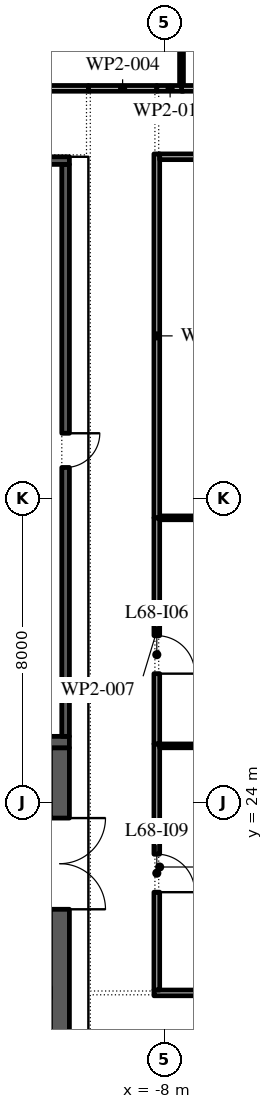
"""IFC4 building model, lengths in metres.
Left out: names, types, materials, properties, quantities, classifications, styles, units other than length and angle.
Written with IfcOpenShell. Run it as: python <this file> out.ifc"""

import sys

from ifc_helpers import new_model, si_unit, direction, frame, frame_2d, origin, place, context, subcontext, project, spatial, rectangle, extrude, element, fill, save


model = new_model("IFC4")
c1 = context("Model", 3, precision=1e-05, world=origin(), true_north=direction((0.0, 1.0)))
c2 = subcontext(c1, "Body", "Model", "MODEL_VIEW")
j1 = project(units=[si_unit("LENGTHUNIT", "METRE"), si_unit("PLANEANGLEUNIT", "RADIAN")], contexts=[c1])
p1 = place(None, origin())
s1 = spatial("IfcSite", under=j1, at=p1, CompositionType="ELEMENT")
p2 = place(p1, origin())
s2 = spatial("IfcBuilding", under=s1, at=p2, CompositionType="ELEMENT")
p3 = place(p2, frame((0.0, 0.0, 313.2)))
s3 = spatial("IfcBuildingStorey", under=s2, at=p3, CompositionType="ELEMENT", Elevation=313.2)
p4 = place(p3, frame((-10.75, -2.45, 0.0), z_axis=(0.0, 0.0, 1.0), x_axis=(0.0, 1.0, 0.0)))
e1 = element("IfcWall", 1, at=p4, inside=s3, PredefinedType="SHEAR", context=c2, shape_type="SweptSolid", body=[
    extrude(rectangle(XDim=27.9, YDim=0.5, at=frame_2d((13.95, 0.0))), origin(), (0.0, 0.0, 1.0), 4.0),
])
p5 = place(p4, frame((23.65, 0.0, 0.0)))
e2 = element("IfcOpeningElement", 2, at=p5, cuts=e1, PredefinedType="OPENING", context=c2, shape_type="SweptSolid", body=[
    extrude(rectangle(XDim=2.4, YDim=2.1, at=frame_2d((1.2, 1.05))), frame((0.0, 0.26, 0.0), z_axis=(0.0, -1.0, 0.0), x_axis=(1.0, 0.0, 0.0)), (0.0, 0.0, 1.0), 0.52),
])
p6 = place(p4, frame((0.788, 0.0, 0.0)))
e3 = element("IfcOpeningElement", 3, at=p6, cuts=e1, PredefinedType="OPENING", context=c2, shape_type="SweptSolid", body=[
    extrude(rectangle(XDim=0.9, YDim=2.1, at=frame_2d((0.45, 1.05))), frame((0.0, 0.26, 0.0), z_axis=(0.0, -1.0, 0.0), x_axis=(1.0, 0.0, 0.0)), (0.0, 0.0, 1.0), 0.52),
])
p7 = place(p4, frame((3.962, 0.0, 0.0)))
e4 = element("IfcOpeningElement", 4, at=p7, cuts=e1, PredefinedType="OPENING", context=c2, shape_type="SweptSolid", body=[
    extrude(rectangle(XDim=1.0, YDim=2.1, at=frame_2d((0.5, 1.05))), frame((0.0, 0.26, 0.0), z_axis=(0.0, -1.0, 0.0), x_axis=(1.0, 0.0, 0.0)), (0.0, 0.0, 1.0), 0.52),
])
p8 = place(p3, frame((-21.5, 25.6, 0.0), z_axis=(0.0, 0.0, 1.0), x_axis=(1.0, 0.0, 0.0)))
e5 = element("IfcWall", 5, at=p8, inside=s3, PredefinedType="SHEAR", context=c2, shape_type="SweptSolid", body=[
    extrude(rectangle(XDim=11.0, YDim=0.3, at=frame_2d((5.5, 0.0))), origin(), (0.0, 0.0, 1.0), 4.0),
])
p9 = place(p3, frame((-10.6, 25.75, 0.0), z_axis=(0.0, 0.0, 1.0), x_axis=(0.0, 1.0, 0.0)))
e6 = element("IfcWall", 6, at=p9, inside=s3, PredefinedType="SHEAR", context=c2, shape_type="SweptSolid", body=[
    extrude(rectangle(XDim=15.05, YDim=0.2, at=frame_2d((7.525, 0.0))), origin(), (0.0, 0.0, 1.0), 4.0),
])
p10 = place(p9, frame((7.075, 0.0, 0.0)))
e7 = element("IfcOpeningElement", 7, at=p10, cuts=e6, PredefinedType="OPENING", context=c2, shape_type="SweptSolid", body=[
    extrude(rectangle(XDim=0.9, YDim=2.1, at=frame_2d((0.45, 1.05))), frame((0.0, 0.11, 0.0), z_axis=(0.0, -1.0, 0.0), x_axis=(1.0, 0.0, 0.0)), (0.0, 0.0, 1.0), 0.22),
])
p11 = place(p3, frame((-21.5, 40.9, 0.0), z_axis=(0.0, 0.0, 1.0), x_axis=(1.0, 0.0, 0.0)))
e8 = element("IfcWall", 8, at=p11, inside=s3, PredefinedType="SHEAR", context=c2, shape_type="SweptSolid", body=[
    extrude(rectangle(XDim=11.0, YDim=0.2, at=frame_2d((5.5, 0.0))), origin(), (0.0, 0.0, 1.0), 4.0),
])
p12 = place(p3, frame((-26.05, 42.8, 0.0), z_axis=(0.0, 0.0, 1.0), x_axis=(1.0, 0.0, 0.0)))
e9 = element("IfcWall", 9, at=p12, inside=s3, PredefinedType="PARTITIONING", context=c2, shape_type="SweptSolid", body=[
    extrude(rectangle(XDim=16.05, YDim=0.15, at=frame_2d((8.025, 0.0))), origin(), (0.0, 0.0, 1.0), 4.0),
])
p13 = place(p12, frame((4.15, 0.0, 0.0)))
e10 = element("IfcOpeningElement", 10, at=p13, cuts=e9, PredefinedType="OPENING", context=c2, shape_type="SweptSolid", body=[
    extrude(rectangle(XDim=1.0, YDim=2.1, at=frame_2d((0.5, 1.05))), frame((0.0, 0.085, 0.0), z_axis=(0.0, -1.0, 0.0), x_axis=(1.0, 0.0, 0.0)), (0.0, 0.0, 1.0), 0.17),
])
p14 = place(p3, frame((-10.0, 42.8, 0.0), z_axis=(0.0, 0.0, 1.0), x_axis=(1.0, 0.0, 0.0)))
e11 = element("IfcWall", 11, at=p14, inside=s3, PredefinedType="PARTITIONING", context=c2, shape_type="SweptSolid", body=[
    extrude(rectangle(XDim=1.8, YDim=0.15, at=frame_2d((0.9, 0.0))), origin(), (0.0, 0.0, 1.0), 4.0),
])
p15 = place(p3, frame((-8.275, 19.0, 0.0), z_axis=(0.0, 0.0, 1.0), x_axis=(1.0, 0.0, 0.0)))
e12 = element("IfcWall", 12, at=p15, inside=s3, PredefinedType="PARTITIONING", context=c2, shape_type="SweptSolid", body=[
    extrude(rectangle(XDim=4.325, YDim=0.15, at=frame_2d((2.163, 0.0))), origin(), (0.0, 0.0, 1.0), 4.0),
])
p16 = place(p3, frame((-8.2, 25.55, 0.0), z_axis=(0.0, 0.0, 1.0), x_axis=(0.0, -1.0, 0.0)))
e13 = element("IfcWall", 13, at=p16, inside=s3, PredefinedType="PARTITIONING", context=c2, shape_type="SweptSolid", body=[
    extrude(rectangle(XDim=6.475, YDim=0.15, at=frame_2d((3.238, 0.0))), origin(), (0.0, 0.0, 1.0), 4.0),
])
p17 = place(p16, frame((2.9, 0.0, 0.0)))
e14 = element("IfcOpeningElement", 14, at=p17, cuts=e13, PredefinedType="OPENING", context=c2, shape_type="SweptSolid", body=[
    extrude(rectangle(XDim=1.0, YDim=2.1, at=frame_2d((0.5, 1.05))), frame((0.0, 0.085, 0.0), z_axis=(0.0, -1.0, 0.0), x_axis=(1.0, 0.0, 0.0)), (0.0, 0.0, 1.0), 0.17),
])
p18 = place(p3, frame((-8.2, 31.5, 0.0), z_axis=(0.0, 0.0, 1.0), x_axis=(0.0, -1.0, 0.0)))
e15 = element("IfcWall", 15, at=p18, inside=s3, PredefinedType="PARTITIONING", context=c2, shape_type="SweptSolid", body=[
    extrude(rectangle(XDim=5.95, YDim=0.15, at=frame_2d((2.975, 0.0))), origin(), (0.0, 0.0, 1.0), 4.0),
])
p19 = place(p18, frame((3.1, 0.0, 0.0)))
e16 = element("IfcOpeningElement", 16, at=p19, cuts=e15, PredefinedType="OPENING", context=c2, shape_type="SweptSolid", body=[
    extrude(rectangle(XDim=1.0, YDim=2.1, at=frame_2d((0.5, 1.05))), frame((0.0, 0.085, 0.0), z_axis=(0.0, -1.0, 0.0), x_axis=(1.0, 0.0, 0.0)), (0.0, 0.0, 1.0), 0.17),
])
p20 = place(p3, frame((-8.125, 31.5, 0.0), z_axis=(0.0, 0.0, 1.0), x_axis=(1.0, 0.0, 0.0)))
e17 = element("IfcWall", 17, at=p20, inside=s3, PredefinedType="PARTITIONING", context=c2, shape_type="SweptSolid", body=[
    extrude(rectangle(XDim=10.675, YDim=0.1, at=frame_2d((5.337, 0.0))), origin(), (0.0, 0.0, 1.0), 4.0),
])
p21 = place(p3, frame((-8.2, 41.075, 0.0), z_axis=(0.0, 0.0, 1.0), x_axis=(0.0, -1.0, 0.0)))
e18 = element("IfcWall", 18, at=p21, inside=s3, PredefinedType="PARTITIONING", context=c2, shape_type="SweptSolid", body=[
    extrude(rectangle(XDim=9.575, YDim=0.15, at=frame_2d((4.788, 0.0))), origin(), (0.0, 0.0, 1.0), 4.0),
])
p22 = place(p3, frame((-8.2, 42.8, 0.0), z_axis=(0.0, 0.0, 1.0), x_axis=(1.0, 0.0, 0.0)))
e19 = element("IfcWall", 19, at=p22, inside=s3, PredefinedType="PARTITIONING", context=c2, shape_type="SweptSolid", body=[
    extrude(rectangle(XDim=0.7, YDim=0.15, at=frame_2d((0.35, 0.0))), origin(), (0.0, 0.0, 1.0), 4.0),
])
p23 = place(p3, frame((-7.55, 42.875, 0.0), z_axis=(0.0, 0.0, 1.0), x_axis=(0.0, 1.0, 0.0)))
e20 = element("IfcWall", 20, at=p23, inside=s3, PredefinedType="PARTITIONING", context=c2, shape_type="SweptSolid", body=[
    extrude(rectangle(XDim=9.925, YDim=0.1, at=frame_2d((4.962, 0.0))), origin(), (0.0, 0.0, 1.0), 4.0),
])
p24 = place(p3, frame((-7.55, 42.8, 0.0), z_axis=(0.0, 0.0, 1.0), x_axis=(1.0, 0.0, 0.0)))
e21 = element("IfcWall", 21, at=p24, inside=s3, PredefinedType="PARTITIONING", context=c2, shape_type="SweptSolid", body=[
    extrude(rectangle(XDim=15.15, YDim=0.15, at=frame_2d((7.575, 0.0))), origin(), (0.0, 0.0, 1.0), 4.0),
])
p25 = place(p24, frame((3.95, 0.0, 0.0)))
e22 = element("IfcOpeningElement", 22, at=p25, cuts=e21, PredefinedType="OPENING", context=c2, shape_type="SweptSolid", body=[
    extrude(rectangle(XDim=1.0, YDim=2.1, at=frame_2d((0.5, 1.05))), frame((0.0, 0.085, 0.0), z_axis=(0.0, -1.0, 0.0), x_axis=(1.0, 0.0, 0.0)), (0.0, 0.0, 1.0), 0.17),
])
p26 = place(p3, frame((-4.05, 25.5, 0.0), z_axis=(0.0, 0.0, 1.0), x_axis=(-1.0, 0.0, 0.0)))
e23 = element("IfcWall", 23, at=p26, inside=s3, PredefinedType="PARTITIONING", context=c2, shape_type="SweptSolid", body=[
    extrude(rectangle(XDim=4.075, YDim=0.1, at=frame_2d((2.038, 0.0))), origin(), (0.0, 0.0, 1.0), 4.0),
])
p27 = place(p3, frame((2.45, 41.0, 0.0), z_axis=(0.0, 0.0, 1.0), x_axis=(-1.0, 0.0, 0.0)))
e24 = element("IfcWall", 24, at=p27, inside=s3, PredefinedType="PARTITIONING", context=c2, shape_type="SweptSolid", body=[
    extrude(rectangle(XDim=10.575, YDim=0.15, at=frame_2d((5.288, 0.0))), origin(), (0.0, 0.0, 1.0), 4.0),
])
p28 = place(p27, frame((2.75, 0.0, 0.0)))
e25 = element("IfcOpeningElement", 25, at=p28, cuts=e24, PredefinedType="OPENING", context=c2, shape_type="SweptSolid", body=[
    extrude(rectangle(XDim=1.0, YDim=2.1, at=frame_2d((0.5, 1.05))), frame((0.0, 0.085, 0.0), z_axis=(0.0, -1.0, 0.0), x_axis=(1.0, 0.0, 0.0)), (0.0, 0.0, 1.0), 0.17),
])
p29 = place(p5, frame((2.4, 0.0, 0.0), z_axis=(0.0, 0.0, 1.0), x_axis=(-1.0, 0.0, 0.0)))
e26 = element("IfcDoor", 26, at=p29, inside=s3, OperationType="DOUBLE_DOOR_SINGLE_SWING", PredefinedType="DOOR", context=c2, shape_type="SweptSolid", body=[
    extrude(rectangle(XDim=2.4, YDim=2.1, at=frame_2d((1.2, 1.05))), frame((0.0, 0.025, 0.0), z_axis=(0.0, -1.0, 0.0), x_axis=(1.0, 0.0, 0.0)), (0.0, 0.0, 1.0), 0.05),
])
fill(e2, e26)
p30 = place(p10, frame((0.9, 0.15, 0.0), z_axis=(0.0, 0.0, 1.0), x_axis=(-1.0, 0.0, 0.0)))
e27 = element("IfcDoor", 27, at=p30, inside=s3, OperationType="SINGLE_SWING_RIGHT", PredefinedType="DOOR", context=c2, shape_type="SweptSolid", body=[
    extrude(rectangle(XDim=0.9, YDim=2.1, at=frame_2d((0.45, 1.05))), frame((0.0, 0.1, 0.0), z_axis=(0.0, -1.0, 0.0), x_axis=(1.0, 0.0, 0.0)), (0.0, 0.0, 1.0), 0.05),
])
fill(e7, e27)
p31 = place(p19, origin())
e28 = element("IfcDoor", 28, at=p31, inside=s3, OperationType="SINGLE_SWING_LEFT", PredefinedType="DOOR", context=c2, shape_type="SweptSolid", body=[
    extrude(rectangle(XDim=1.0, YDim=2.1, at=frame_2d((0.5, 1.05))), frame((0.0, 0.025, 0.0), z_axis=(0.0, -1.0, 0.0), x_axis=(1.0, 0.0, 0.0)), (0.0, 0.0, 1.0), 0.05),
])
fill(e16, e28)
p32 = place(p17, origin())
e29 = element("IfcDoor", 29, at=p32, inside=s3, OperationType="SINGLE_SWING_LEFT", PredefinedType="DOOR", context=c2, shape_type="SweptSolid", body=[
    extrude(rectangle(XDim=1.0, YDim=2.1, at=frame_2d((0.5, 1.05))), frame((0.0, 0.025, 0.0), z_axis=(0.0, -1.0, 0.0), x_axis=(1.0, 0.0, 0.0)), (0.0, 0.0, 1.0), 0.05),
])
fill(e14, e29)
save(model, sys.argv[1])
